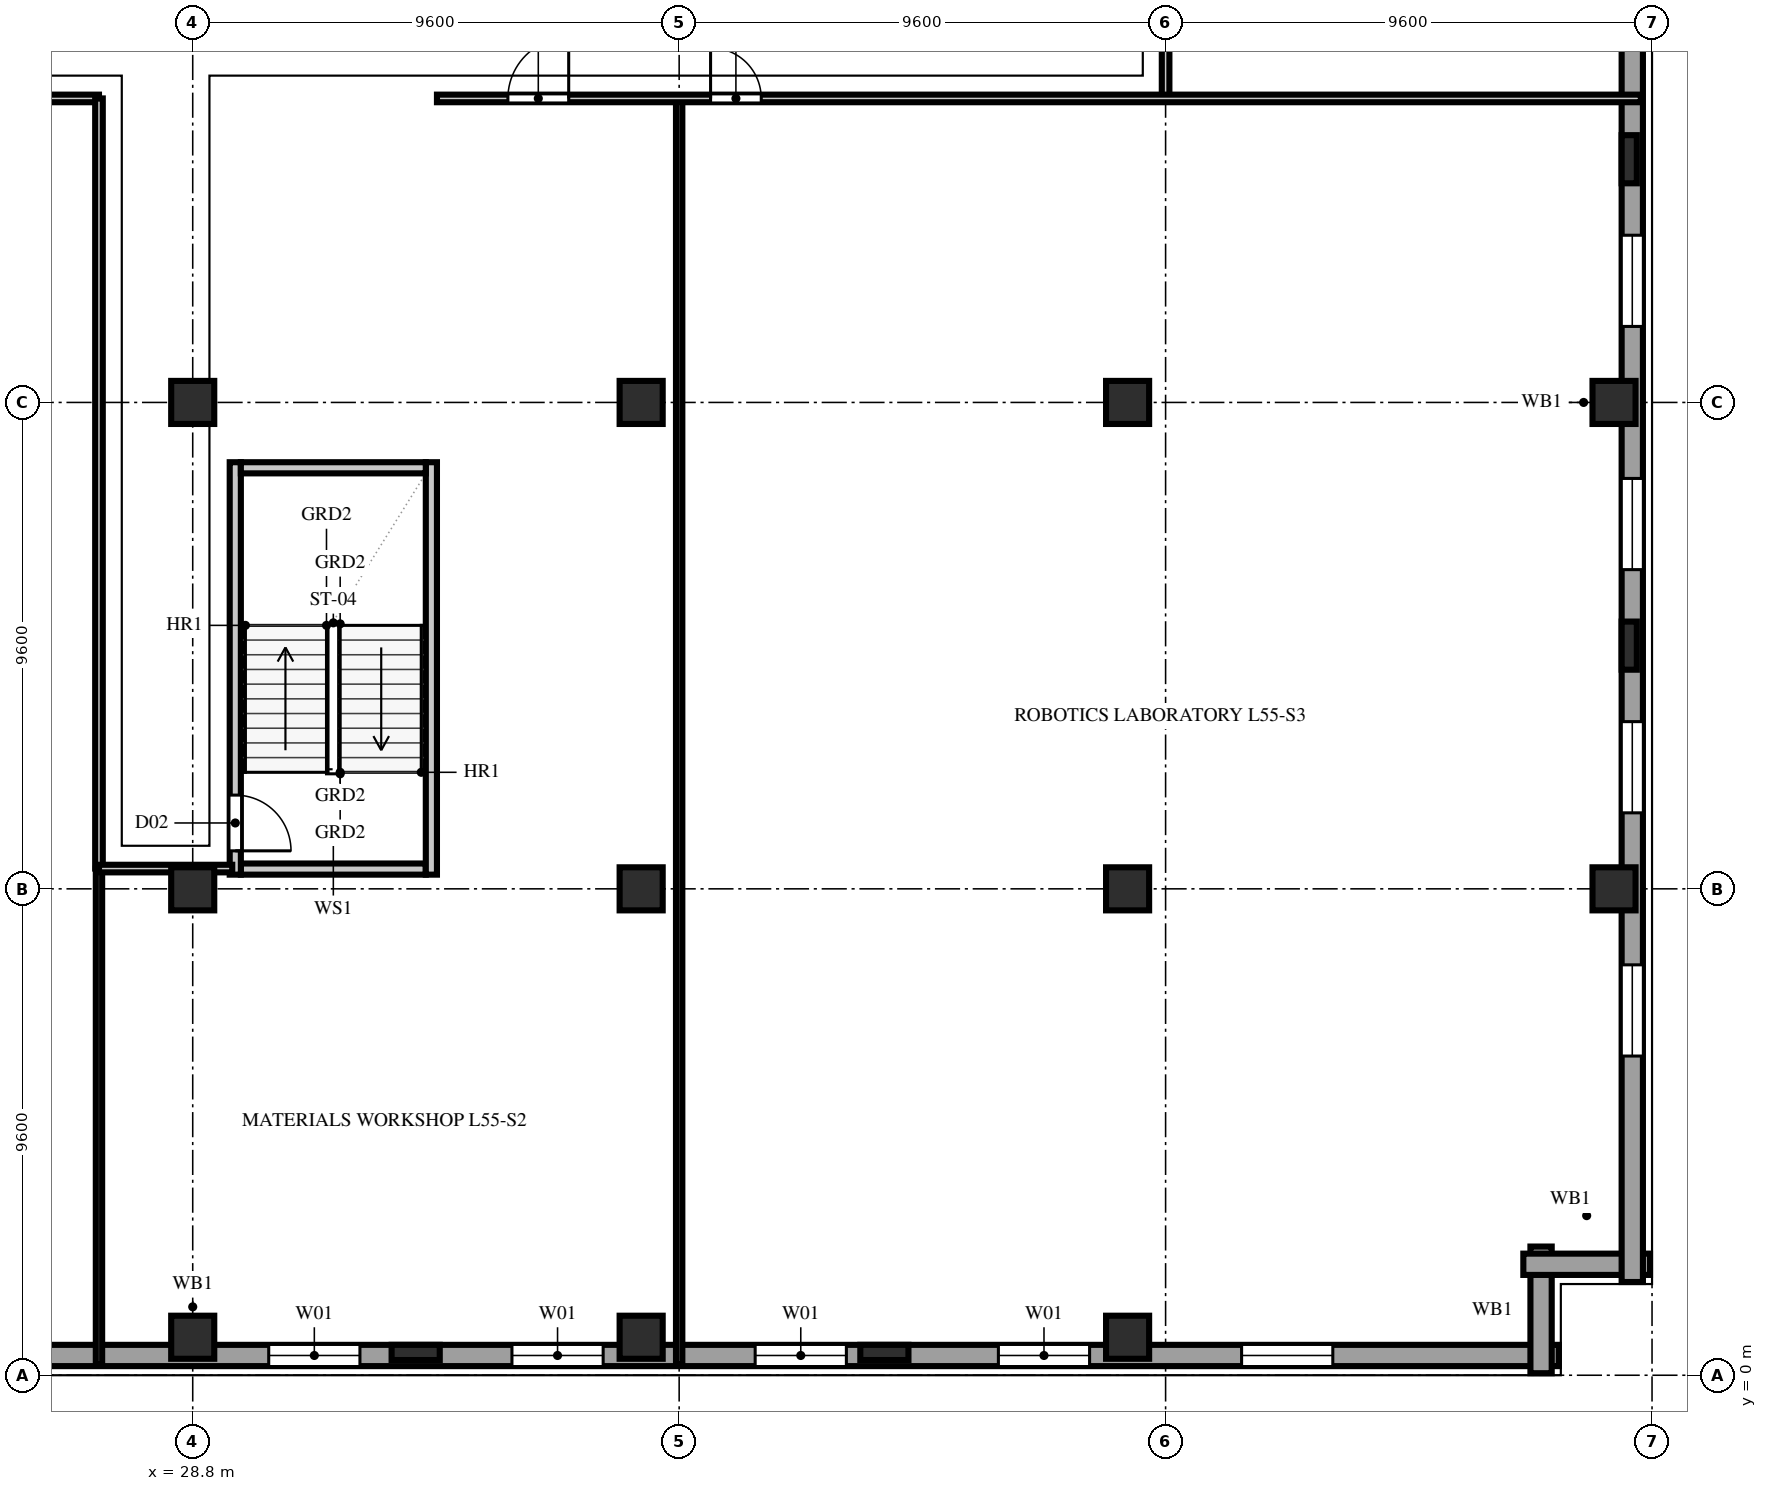
"""IFC4 building model, lengths in metres.
Left out: names, types, materials, properties, quantities, classifications, styles, units other than length and angle.
Written with IfcOpenShell. Run it as: python <this file> out.ifc"""

import sys

from ifc_helpers import new_model, si_unit, direction, frame, frame_2d, origin, origin_2d, place, context, subcontext, project, spatial, rectangle, extrude, element, fill, save


model = new_model("IFC4")
c1 = context("Model", 3, precision=1e-05, world=origin(), true_north=direction((0.0, 1.0)))
c2 = subcontext(c1, "Body", "Model", "MODEL_VIEW")
j1 = project(units=[si_unit("LENGTHUNIT", "METRE"), si_unit("PLANEANGLEUNIT", "RADIAN")], contexts=[c1])
p1 = place(None, origin())
s1 = spatial("IfcSite", under=j1, at=p1, CompositionType="ELEMENT")
p2 = place(p1, origin())
s2 = spatial("IfcBuilding", under=s1, at=p2, CompositionType="ELEMENT")
p3 = place(p2, frame((0.0, 0.0, 218.0)))
s3 = spatial("IfcBuildingStorey", under=s2, at=p3, CompositionType="ELEMENT", Elevation=218.0)
for number, where, z_axis, x_axis in (
    (1, (28.8, 0.75, 0.0), (0.0, 0.0, 1.0), (1.0, 0.0, 0.0)),
    (2, (28.8, 9.6, 0.0), (0.0, 0.0, 1.0), (1.0, 0.0, 0.0)),
    (3, (28.8, 19.2, 0.0), (0.0, 0.0, 1.0), (1.0, 0.0, 0.0)),
    (4, (37.65, 0.75, 0.0), (0.0, 0.0, 1.0), (1.0, 0.0, 0.0)),
    (5, (37.65, 9.6, 0.0), (0.0, 0.0, 1.0), (1.0, 0.0, 0.0)),
    (6, (37.65, 19.2, 0.0), (0.0, 0.0, 1.0), (1.0, 0.0, 0.0)),
    (7, (47.25, 0.75, 0.0), (0.0, 0.0, 1.0), (1.0, 0.0, 0.0)),
    (8, (47.25, 9.6, 0.0), (0.0, 0.0, 1.0), (1.0, 0.0, 0.0)),
    (9, (47.25, 19.2, 0.0), (0.0, 0.0, 1.0), (1.0, 0.0, 0.0)),
    (10, (56.85, 9.6, 0.0), (0.0, 0.0, 1.0), (1.0, 0.0, 0.0)),
    (11, (56.85, 19.2, 0.0), (0.0, 0.0, 1.0), (1.0, 0.0, 0.0)),
):
    element("IfcColumn", number, at=place(p3, frame(where, z_axis=z_axis, x_axis=x_axis)), inside=s3, PredefinedType="COLUMN", context=c2, shape_type="SweptSolid", body=[
        extrude(rectangle(XDim=0.85, YDim=0.85, at=origin_2d()), origin(), (0.0, 0.0, 1.0), 3.8),
    ])
for number, where, z_axis, x_axis in (
    (12, (33.2, 0.45, 0.0), (0.0, 0.0, 1.0), (1.0, 0.0, 0.0)),
    (13, (42.45, 0.45, 0.0), (0.0, 0.0, 1.0), (1.0, 0.0, 0.0)),
    (14, (57.15, 14.4, 0.0), (0.0, 0.0, 1.0), (0.0, 1.0, 0.0)),
    (15, (57.15, 24.0, 0.0), (0.0, 0.0, 1.0), (0.0, 1.0, 0.0)),
):
    element("IfcColumn", number, at=place(p3, frame(where, z_axis=z_axis, x_axis=x_axis)), inside=s3, PredefinedType="PILASTER", context=c2, shape_type="SweptSolid", body=[
        extrude(rectangle(XDim=0.95, YDim=0.3, at=origin_2d()), origin(), (0.0, 0.0, 1.0), 3.8),
    ])
p4 = place(p3, frame((1.84, 0.39, 0.0), z_axis=(0.0, 0.0, 1.0), x_axis=(1.0, 0.0, 0.0)))
e16 = element("IfcWall", 16, at=p4, inside=s3, PredefinedType="SOLIDWALL", context=c2, shape_type="SweptSolid", body=[
    extrude(rectangle(XDim=53.92, YDim=0.42, at=frame_2d((26.96, 0.0))), origin(), (0.0, 0.0, 1.0), 3.54),
])
p5 = place(p4, frame((4.46, 0.0, 0.85)))
e17 = element("IfcOpeningElement", 17, at=p5, cuts=e16, PredefinedType="OPENING", context=c2, shape_type="SweptSolid", body=[
    extrude(rectangle(XDim=1.8, YDim=1.85, at=frame_2d((0.9, 0.925))), frame((0.0, 0.222, 0.0), z_axis=(0.0, -1.0, 0.0), x_axis=(1.0, 0.0, 0.0)), (0.0, 0.0, 1.0), 0.444),
])
p6 = place(p4, frame((9.26, 0.0, 0.85)))
e18 = element("IfcOpeningElement", 18, at=p6, cuts=e16, PredefinedType="OPENING", context=c2, shape_type="SweptSolid", body=[
    extrude(rectangle(XDim=1.8, YDim=1.85, at=frame_2d((0.9, 0.925))), frame((0.0, 0.222, 0.0), z_axis=(0.0, -1.0, 0.0), x_axis=(1.0, 0.0, 0.0)), (0.0, 0.0, 1.0), 0.444),
])
p7 = place(p4, frame((18.86, 0.0, 0.85)))
e19 = element("IfcOpeningElement", 19, at=p7, cuts=e16, PredefinedType="OPENING", context=c2, shape_type="SweptSolid", body=[
    extrude(rectangle(XDim=1.8, YDim=1.85, at=frame_2d((0.9, 0.925))), frame((0.0, 0.222, 0.0), z_axis=(0.0, -1.0, 0.0), x_axis=(1.0, 0.0, 0.0)), (0.0, 0.0, 1.0), 0.444),
])
p8 = place(p4, frame((28.46, 0.0, 0.85)))
e20 = element("IfcOpeningElement", 20, at=p8, cuts=e16, PredefinedType="OPENING", context=c2, shape_type="SweptSolid", body=[
    extrude(rectangle(XDim=1.8, YDim=1.85, at=frame_2d((0.9, 0.925))), frame((0.0, 0.222, 0.0), z_axis=(0.0, -1.0, 0.0), x_axis=(1.0, 0.0, 0.0)), (0.0, 0.0, 1.0), 0.444),
])
p9 = place(p4, frame((33.26, 0.0, 0.85)))
e21 = element("IfcOpeningElement", 21, at=p9, cuts=e16, PredefinedType="OPENING", context=c2, shape_type="SweptSolid", body=[
    extrude(rectangle(XDim=1.8, YDim=1.85, at=frame_2d((0.9, 0.925))), frame((0.0, 0.222, 0.0), z_axis=(0.0, -1.0, 0.0), x_axis=(1.0, 0.0, 0.0)), (0.0, 0.0, 1.0), 0.444),
])
p10 = place(p4, frame((38.06, 0.0, 0.85)))
e22 = element("IfcOpeningElement", 22, at=p10, cuts=e16, PredefinedType="OPENING", context=c2, shape_type="SweptSolid", body=[
    extrude(rectangle(XDim=1.8, YDim=1.85, at=frame_2d((0.9, 0.925))), frame((0.0, 0.222, 0.0), z_axis=(0.0, -1.0, 0.0), x_axis=(1.0, 0.0, 0.0)), (0.0, 0.0, 1.0), 0.444),
])
p11 = place(p4, frame((42.86, 0.0, 0.85)))
e23 = element("IfcOpeningElement", 23, at=p11, cuts=e16, PredefinedType="OPENING", context=c2, shape_type="SweptSolid", body=[
    extrude(rectangle(XDim=1.8, YDim=1.85, at=frame_2d((0.9, 0.925))), frame((0.0, 0.222, 0.0), z_axis=(0.0, -1.0, 0.0), x_axis=(1.0, 0.0, 0.0)), (0.0, 0.0, 1.0), 0.444),
])
p12 = place(p4, frame((47.66, 0.0, 0.85)))
e24 = element("IfcOpeningElement", 24, at=p12, cuts=e16, PredefinedType="OPENING", context=c2, shape_type="SweptSolid", body=[
    extrude(rectangle(XDim=1.8, YDim=1.85, at=frame_2d((0.9, 0.925))), frame((0.0, 0.222, 0.0), z_axis=(0.0, -1.0, 0.0), x_axis=(1.0, 0.0, 0.0)), (0.0, 0.0, 1.0), 0.444),
])
for number, where, z_axis, x_axis in (
    (25, (55.41, 0.04, 0.0), (0.0, 0.0, 1.0), (0.0, 1.0, 0.0)),
    (26, (55.06, 2.19, 0.0), (0.0, 0.0, 1.0), (1.0, 0.0, 0.0)),
):
    element("IfcWall", number, at=place(p3, frame(where, z_axis=z_axis, x_axis=x_axis)), inside=s3, PredefinedType="SOLIDWALL", context=c2, shape_type="SweptSolid", body=[
        extrude(rectangle(XDim=2.5, YDim=0.42, at=frame_2d((1.25, 0.0))), origin(), (0.0, 0.0, 1.0), 3.54),
    ])
p13 = place(p3, frame((57.21, 1.84, 0.0), z_axis=(0.0, 0.0, 1.0), x_axis=(0.0, 1.0, 0.0)))
e27 = element("IfcWall", 27, at=p13, inside=s3, PredefinedType="SOLIDWALL", context=c2, shape_type="SweptSolid", body=[
    extrude(rectangle(XDim=34.72, YDim=0.42, at=frame_2d((17.36, 0.0))), origin(), (0.0, 0.0, 1.0), 3.54),
])
p14 = place(p13, frame((4.46, 0.0, 0.85)))
e28 = element("IfcOpeningElement", 28, at=p14, cuts=e27, PredefinedType="OPENING", context=c2, shape_type="SweptSolid", body=[
    extrude(rectangle(XDim=1.8, YDim=1.85, at=frame_2d((0.9, 0.925))), frame((0.0, 0.222, 0.0), z_axis=(0.0, -1.0, 0.0), x_axis=(1.0, 0.0, 0.0)), (0.0, 0.0, 1.0), 0.444),
])
p15 = place(p13, frame((9.26, 0.0, 0.85)))
e29 = element("IfcOpeningElement", 29, at=p15, cuts=e27, PredefinedType="OPENING", context=c2, shape_type="SweptSolid", body=[
    extrude(rectangle(XDim=1.8, YDim=1.85, at=frame_2d((0.9, 0.925))), frame((0.0, 0.222, 0.0), z_axis=(0.0, -1.0, 0.0), x_axis=(1.0, 0.0, 0.0)), (0.0, 0.0, 1.0), 0.444),
])
p16 = place(p13, frame((14.06, 0.0, 0.85)))
e30 = element("IfcOpeningElement", 30, at=p16, cuts=e27, PredefinedType="OPENING", context=c2, shape_type="SweptSolid", body=[
    extrude(rectangle(XDim=1.8, YDim=1.85, at=frame_2d((0.9, 0.925))), frame((0.0, 0.222, 0.0), z_axis=(0.0, -1.0, 0.0), x_axis=(1.0, 0.0, 0.0)), (0.0, 0.0, 1.0), 0.444),
])
p17 = place(p13, frame((18.86, 0.0, 0.85)))
e31 = element("IfcOpeningElement", 31, at=p17, cuts=e27, PredefinedType="OPENING", context=c2, shape_type="SweptSolid", body=[
    extrude(rectangle(XDim=1.8, YDim=1.85, at=frame_2d((0.9, 0.925))), frame((0.0, 0.222, 0.0), z_axis=(0.0, -1.0, 0.0), x_axis=(1.0, 0.0, 0.0)), (0.0, 0.0, 1.0), 0.444),
])
p18 = place(p13, frame((28.46, 0.0, 0.85)))
e32 = element("IfcOpeningElement", 32, at=p18, cuts=e27, PredefinedType="OPENING", context=c2, shape_type="SweptSolid", body=[
    extrude(rectangle(XDim=1.8, YDim=1.85, at=frame_2d((0.9, 0.925))), frame((0.0, 0.222, 0.0), z_axis=(0.0, -1.0, 0.0), x_axis=(1.0, 0.0, 0.0)), (0.0, 0.0, 1.0), 0.444),
])
p19 = place(p3, frame((29.75, 9.99, 0.0), z_axis=(0.0, 0.0, 1.0), x_axis=(1.0, 0.0, 0.0)))
e33 = element("IfcWall", 33, at=p19, inside=s3, PredefinedType="SOLIDWALL", context=c2, shape_type="SweptSolid", body=[
    extrude(rectangle(XDim=3.65, YDim=0.22, at=frame_2d((1.825, 0.0))), origin(), (0.0, 0.0, 1.0), 3.54),
])
p20 = place(p3, frame((29.64, 9.88, 0.0), z_axis=(0.0, 0.0, 1.0), x_axis=(0.0, 1.0, 0.0)))
e34 = element("IfcWall", 34, at=p20, inside=s3, PredefinedType="SOLIDWALL", context=c2, shape_type="SweptSolid", body=[
    extrude(rectangle(XDim=8.14, YDim=0.22, at=frame_2d((4.07, 0.0))), origin(), (0.0, 0.0, 1.0), 3.54),
])
p21 = place(p20, frame((0.47, 0.0, 0.0)))
e35 = element("IfcOpeningElement", 35, at=p21, cuts=e34, PredefinedType="OPENING", context=c2, shape_type="SweptSolid", body=[
    extrude(rectangle(XDim=1.1, YDim=2.2, at=frame_2d((0.55, 1.1))), frame((0.0, 0.122, 0.0), z_axis=(0.0, -1.0, 0.0), x_axis=(1.0, 0.0, 0.0)), (0.0, 0.0, 1.0), 0.244),
])
p22 = place(p3, frame((33.51, 9.88, 0.0), z_axis=(0.0, 0.0, 1.0), x_axis=(0.0, 1.0, 0.0)))
e36 = element("IfcWall", 36, at=p22, inside=s3, PredefinedType="SOLIDWALL", context=c2, shape_type="SweptSolid", body=[
    extrude(rectangle(XDim=8.14, YDim=0.22, at=frame_2d((4.07, 0.0))), origin(), (0.0, 0.0, 1.0), 3.54),
])
p23 = place(p3, frame((29.75, 17.91, 0.0), z_axis=(0.0, 0.0, 1.0), x_axis=(1.0, 0.0, 0.0)))
e37 = element("IfcWall", 37, at=p23, inside=s3, PredefinedType="SOLIDWALL", context=c2, shape_type="SweptSolid", body=[
    extrude(rectangle(XDim=3.65, YDim=0.22, at=frame_2d((1.825, 0.0))), origin(), (0.0, 0.0, 1.0), 3.54),
])
p24 = place(p3, frame((48.0, 25.2, 0.0), z_axis=(0.0, 0.0, 1.0), x_axis=(0.0, 1.0, 0.0)))
e38 = element("IfcWall", 38, at=p24, inside=s3, PredefinedType="PARTITIONING", context=c2, shape_type="SweptSolid", body=[
    extrude(rectangle(XDim=2.1, YDim=0.15, at=frame_2d((1.05, 0.0))), origin(), (0.0, 0.0, 1.0), 3.54),
])
p25 = place(p3, frame((19.2, 25.2, 0.0), z_axis=(0.0, 0.0, 1.0), x_axis=(1.0, 0.0, 0.0)))
e39 = element("IfcWall", 39, at=p25, inside=s3, PredefinedType="PARTITIONING", context=c2, shape_type="SweptSolid", body=[
    extrude(rectangle(XDim=7.75, YDim=0.15, at=frame_2d((3.875, 0.0))), origin(), (0.0, 0.0, 1.0), 3.54),
])
p26 = place(p25, frame((2.8, 0.0, 0.0)))
e40 = element("IfcOpeningElement", 40, at=p26, cuts=e39, PredefinedType="OPENING", context=c2, shape_type="SweptSolid", body=[
    extrude(rectangle(XDim=1.0, YDim=2.2, at=frame_2d((0.5, 1.1))), frame((0.0, 0.087, 0.0), z_axis=(0.0, -1.0, 0.0), x_axis=(1.0, 0.0, 0.0)), (0.0, 0.0, 1.0), 0.174),
])
p27 = place(p3, frame((26.95, 0.22, 0.0), z_axis=(0.0, 0.0, 1.0), x_axis=(0.0, 1.0, 0.0)))
e41 = element("IfcWall", 41, at=p27, inside=s3, PredefinedType="PARTITIONING", context=c2, shape_type="SweptSolid", body=[
    extrude(rectangle(XDim=9.78, YDim=0.125, at=frame_2d((4.89, 0.0))), origin(), (0.0, 0.0, 1.0), 3.54),
])
p28 = place(p3, frame((26.95, 10.0, 0.0), z_axis=(0.0, 0.0, 1.0), x_axis=(0.0, 1.0, 0.0)))
e42 = element("IfcWall", 42, at=p28, inside=s3, PredefinedType="PARTITIONING", context=c2, shape_type="SweptSolid", body=[
    extrude(rectangle(XDim=15.2, YDim=0.15, at=frame_2d((7.6, 0.0))), origin(), (0.0, 0.0, 1.0), 3.54),
])
p29 = place(p3, frame((26.95, 10.0, 0.0), z_axis=(0.0, 0.0, 1.0), x_axis=(1.0, 0.0, 0.0)))
e43 = element("IfcWall", 43, at=p29, inside=s3, PredefinedType="PARTITIONING", context=c2, shape_type="SweptSolid", body=[
    extrude(rectangle(XDim=2.63, YDim=0.15, at=frame_2d((1.315, 0.0))), origin(), (0.0, 0.0, 1.0), 3.54),
])
p30 = place(p3, frame((38.4, 0.22, 0.0), z_axis=(0.0, 0.0, 1.0), x_axis=(0.0, 1.0, 0.0)))
e44 = element("IfcWall", 44, at=p30, inside=s3, PredefinedType="PARTITIONING", context=c2, shape_type="SweptSolid", body=[
    extrude(rectangle(XDim=24.98, YDim=0.125, at=frame_2d((12.49, 0.0))), origin(), (0.0, 0.0, 1.0), 3.54),
])
p31 = place(p3, frame((33.62, 25.2, 0.0), z_axis=(0.0, 0.0, 1.0), x_axis=(1.0, 0.0, 0.0)))
e45 = element("IfcWall", 45, at=p31, inside=s3, PredefinedType="PARTITIONING", context=c2, shape_type="SweptSolid", body=[
    extrude(rectangle(XDim=23.76, YDim=0.15, at=frame_2d((11.88, 0.0))), origin(), (0.0, 0.0, 1.0), 3.54),
])
p32 = place(p31, frame((1.4, 0.0, 0.0)))
e46 = element("IfcOpeningElement", 46, at=p32, cuts=e45, PredefinedType="OPENING", context=c2, shape_type="SweptSolid", body=[
    extrude(rectangle(XDim=1.2, YDim=2.2, at=frame_2d((0.6, 1.1))), frame((0.0, 0.087, 0.0), z_axis=(0.0, -1.0, 0.0), x_axis=(1.0, 0.0, 0.0)), (0.0, 0.0, 1.0), 0.174),
])
p33 = place(p31, frame((5.4, 0.0, 0.0)))
e47 = element("IfcOpeningElement", 47, at=p33, cuts=e45, PredefinedType="OPENING", context=c2, shape_type="SweptSolid", body=[
    extrude(rectangle(XDim=1.0, YDim=2.2, at=frame_2d((0.5, 1.1))), frame((0.0, 0.087, 0.0), z_axis=(0.0, -1.0, 0.0), x_axis=(1.0, 0.0, 0.0)), (0.0, 0.0, 1.0), 0.174),
])
p34 = place(p8, origin())
e48 = element("IfcWindow", 48, at=p34, inside=s3, PartitioningType="DOUBLE_PANEL_VERTICAL", PredefinedType="WINDOW", context=c2, shape_type="SweptSolid", body=[
    extrude(rectangle(XDim=1.8, YDim=1.85, at=frame_2d((0.9, 0.925))), frame((0.0, 0.11, 0.0), z_axis=(0.0, -1.0, 0.0), x_axis=(1.0, 0.0, 0.0)), (0.0, 0.0, 1.0), 0.06),
])
fill(e20, e48)
p35 = place(p9, origin())
e49 = element("IfcWindow", 49, at=p35, inside=s3, PartitioningType="DOUBLE_PANEL_VERTICAL", PredefinedType="WINDOW", context=c2, shape_type="SweptSolid", body=[
    extrude(rectangle(XDim=1.8, YDim=1.85, at=frame_2d((0.9, 0.925))), frame((0.0, 0.11, 0.0), z_axis=(0.0, -1.0, 0.0), x_axis=(1.0, 0.0, 0.0)), (0.0, 0.0, 1.0), 0.06),
])
fill(e21, e49)
p36 = place(p10, origin())
e50 = element("IfcWindow", 50, at=p36, inside=s3, PartitioningType="DOUBLE_PANEL_VERTICAL", PredefinedType="WINDOW", context=c2, shape_type="SweptSolid", body=[
    extrude(rectangle(XDim=1.8, YDim=1.85, at=frame_2d((0.9, 0.925))), frame((0.0, 0.11, 0.0), z_axis=(0.0, -1.0, 0.0), x_axis=(1.0, 0.0, 0.0)), (0.0, 0.0, 1.0), 0.06),
])
fill(e22, e50)
p37 = place(p11, origin())
e51 = element("IfcWindow", 51, at=p37, inside=s3, PartitioningType="DOUBLE_PANEL_VERTICAL", PredefinedType="WINDOW", context=c2, shape_type="SweptSolid", body=[
    extrude(rectangle(XDim=1.8, YDim=1.85, at=frame_2d((0.9, 0.925))), frame((0.0, 0.11, 0.0), z_axis=(0.0, -1.0, 0.0), x_axis=(1.0, 0.0, 0.0)), (0.0, 0.0, 1.0), 0.06),
])
fill(e23, e51)
p38 = place(p12, origin())
e52 = element("IfcWindow", 52, at=p38, inside=s3, PartitioningType="DOUBLE_PANEL_VERTICAL", PredefinedType="WINDOW", context=c2, shape_type="SweptSolid", body=[
    extrude(rectangle(XDim=1.8, YDim=1.85, at=frame_2d((0.9, 0.925))), frame((0.0, 0.11, 0.0), z_axis=(0.0, -1.0, 0.0), x_axis=(1.0, 0.0, 0.0)), (0.0, 0.0, 1.0), 0.06),
])
fill(e24, e52)
p39 = place(p14, origin())
e53 = element("IfcWindow", 53, at=p39, inside=s3, PartitioningType="DOUBLE_PANEL_VERTICAL", PredefinedType="WINDOW", context=c2, shape_type="SweptSolid", body=[
    extrude(rectangle(XDim=1.8, YDim=1.85, at=frame_2d((0.9, 0.925))), frame((0.0, 0.11, 0.0), z_axis=(0.0, -1.0, 0.0), x_axis=(1.0, 0.0, 0.0)), (0.0, 0.0, 1.0), 0.06),
])
fill(e28, e53)
p40 = place(p15, origin())
e54 = element("IfcWindow", 54, at=p40, inside=s3, PartitioningType="DOUBLE_PANEL_VERTICAL", PredefinedType="WINDOW", context=c2, shape_type="SweptSolid", body=[
    extrude(rectangle(XDim=1.8, YDim=1.85, at=frame_2d((0.9, 0.925))), frame((0.0, 0.11, 0.0), z_axis=(0.0, -1.0, 0.0), x_axis=(1.0, 0.0, 0.0)), (0.0, 0.0, 1.0), 0.06),
])
fill(e29, e54)
p41 = place(p16, origin())
e55 = element("IfcWindow", 55, at=p41, inside=s3, PartitioningType="DOUBLE_PANEL_VERTICAL", PredefinedType="WINDOW", context=c2, shape_type="SweptSolid", body=[
    extrude(rectangle(XDim=1.8, YDim=1.85, at=frame_2d((0.9, 0.925))), frame((0.0, 0.11, 0.0), z_axis=(0.0, -1.0, 0.0), x_axis=(1.0, 0.0, 0.0)), (0.0, 0.0, 1.0), 0.06),
])
fill(e30, e55)
p42 = place(p17, origin())
e56 = element("IfcWindow", 56, at=p42, inside=s3, PartitioningType="DOUBLE_PANEL_VERTICAL", PredefinedType="WINDOW", context=c2, shape_type="SweptSolid", body=[
    extrude(rectangle(XDim=1.8, YDim=1.85, at=frame_2d((0.9, 0.925))), frame((0.0, 0.11, 0.0), z_axis=(0.0, -1.0, 0.0), x_axis=(1.0, 0.0, 0.0)), (0.0, 0.0, 1.0), 0.06),
])
fill(e31, e56)
p43 = place(p21, frame((1.1, 0.0, 0.0), z_axis=(0.0, 0.0, 1.0), x_axis=(-1.0, 0.0, 0.0)))
e57 = element("IfcDoor", 57, at=p43, inside=s3, OperationType="SINGLE_SWING_RIGHT", PredefinedType="DOOR", context=c2, shape_type="SweptSolid", body=[
    extrude(rectangle(XDim=1.1, YDim=2.2, at=frame_2d((0.55, 1.1))), frame((0.0, 0.025, 0.0), z_axis=(0.0, -1.0, 0.0), x_axis=(1.0, 0.0, 0.0)), (0.0, 0.0, 1.0), 0.05),
])
fill(e35, e57)
p44 = place(p32, origin())
e58 = element("IfcDoor", 58, at=p44, inside=s3, OperationType="SINGLE_SWING_RIGHT", PredefinedType="DOOR", context=c2, shape_type="SweptSolid", body=[
    extrude(rectangle(XDim=1.2, YDim=2.2, at=frame_2d((0.6, 1.1))), frame((0.0, 0.025, 0.0), z_axis=(0.0, -1.0, 0.0), x_axis=(1.0, 0.0, 0.0)), (0.0, 0.0, 1.0), 0.05),
])
fill(e46, e58)
p45 = place(p33, origin())
e59 = element("IfcDoor", 59, at=p45, inside=s3, OperationType="SINGLE_SWING_LEFT", PredefinedType="DOOR", context=c2, shape_type="SweptSolid", body=[
    extrude(rectangle(XDim=1.0, YDim=2.2, at=frame_2d((0.5, 1.1))), frame((0.0, 0.025, 0.0), z_axis=(0.0, -1.0, 0.0), x_axis=(1.0, 0.0, 0.0)), (0.0, 0.0, 1.0), 0.05),
])
fill(e47, e59)
save(model, sys.argv[1])
